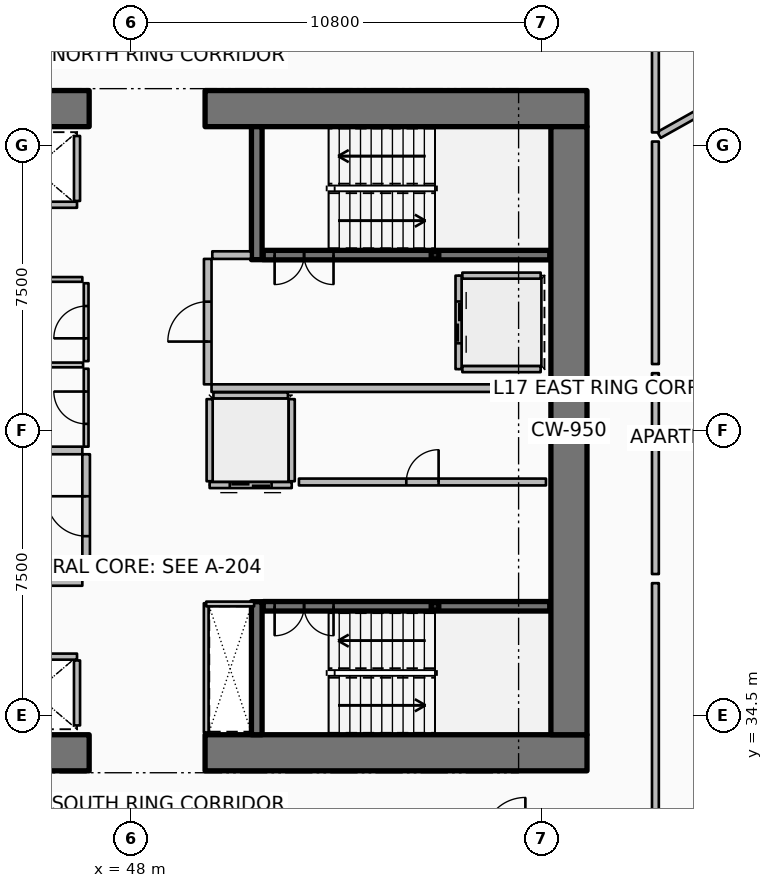
"""IFC4 building model, lengths in metres.
Left out: names, types, materials, properties, quantities, classifications, styles, units other than length and angle.
Written with IfcOpenShell. Run it as: python <this file> out.ifc"""

import sys

from ifc_helpers import new_model, si_unit, direction, frame, frame_2d, origin, origin_2d, place, context, subcontext, project, spatial, rectangle, hollow_rectangle, extrude, element, fill, save


model = new_model("IFC4")
c1 = context("Model", 3, precision=1e-05, world=origin(), true_north=direction((0.0, 1.0)))
c2 = subcontext(c1, "Body", "Model", "MODEL_VIEW")
j1 = project(units=[si_unit("LENGTHUNIT", "METRE"), si_unit("PLANEANGLEUNIT", "RADIAN")], contexts=[c1])
p1 = place(None, origin())
s1 = spatial("IfcSite", under=j1, at=p1, CompositionType="ELEMENT")
p2 = place(p1, origin())
s2 = spatial("IfcBuilding", under=s1, at=p2, CompositionType="ELEMENT")
p3 = place(p2, frame((0.0, 0.0, 71.4)))
s3 = spatial("IfcBuildingStorey", under=s2, at=p3, CompositionType="ELEMENT", Elevation=71.4)
p4 = place(p3, frame((36.85, 33.525, 0.0), z_axis=(0.0, 0.0, 1.0), x_axis=(1.0, 0.0, 0.0)))
e1 = element("IfcWall", 1, at=p4, inside=s3, PredefinedType="SHEAR", context=c2, shape_type="SweptSolid", body=[
    extrude(rectangle(XDim=10.05, YDim=0.95, at=frame_2d((5.025, 0.0))), origin(), (0.0, 0.0, 1.0), 3.75),
])
p5 = place(p3, frame((49.95, 33.525, 0.0), z_axis=(0.0, 0.0, 1.0), x_axis=(1.0, 0.0, 0.0)))
e2 = element("IfcWall", 2, at=p5, inside=s3, PredefinedType="SHEAR", context=c2, shape_type="SweptSolid", body=[
    extrude(rectangle(XDim=10.05, YDim=0.95, at=frame_2d((5.025, 0.0))), origin(), (0.0, 0.0, 1.0), 3.75),
])
p6 = place(p3, frame((36.85, 50.475, 0.0), z_axis=(0.0, 0.0, 1.0), x_axis=(1.0, 0.0, 0.0)))
e3 = element("IfcWall", 3, at=p6, inside=s3, PredefinedType="SHEAR", context=c2, shape_type="SweptSolid", body=[
    extrude(rectangle(XDim=10.05, YDim=0.95, at=frame_2d((5.025, 0.0))), origin(), (0.0, 0.0, 1.0), 3.75),
])
p7 = place(p3, frame((49.95, 50.475, 0.0), z_axis=(0.0, 0.0, 1.0), x_axis=(1.0, 0.0, 0.0)))
e4 = element("IfcWall", 4, at=p7, inside=s3, PredefinedType="SHEAR", context=c2, shape_type="SweptSolid", body=[
    extrude(rectangle(XDim=10.05, YDim=0.95, at=frame_2d((5.025, 0.0))), origin(), (0.0, 0.0, 1.0), 3.75),
])
p8 = place(p3, frame((59.525, 34.0, 0.0), z_axis=(0.0, 0.0, 1.0), x_axis=(0.0, 1.0, 0.0)))
e5 = element("IfcWall", 5, at=p8, inside=s3, PredefinedType="SHEAR", context=c2, shape_type="SweptSolid", body=[
    extrude(rectangle(XDim=16.0, YDim=0.95, at=frame_2d((8.0, 0.0))), origin(), (0.0, 0.0, 1.0), 3.75),
])
for number, where, z_axis, x_axis in (
    (6, (51.31, 46.5, 0.0), (0.0, 0.0, 1.0), (0.0, 1.0, 0.0)),
    (7, (51.31, 34.0, 0.0), (0.0, 0.0, 1.0), (0.0, 1.0, 0.0)),
):
    element("IfcWall", number, at=place(p3, frame(where, z_axis=z_axis, x_axis=x_axis)), inside=s3, PredefinedType="SHEAR", context=c2, shape_type="SweptSolid", body=[
        extrude(rectangle(XDim=3.5, YDim=0.28, at=frame_2d((1.75, 0.0))), origin(), (0.0, 0.0, 1.0), 3.75),
    ])
for number, where, z_axis, x_axis in (
    (8, (56.0, 46.62, 0.0), (0.0, 0.0, 1.0), (1.0, 0.0, 0.0)),
    (9, (56.0, 37.38, 0.0), (0.0, 0.0, 1.0), (1.0, 0.0, 0.0)),
):
    element("IfcColumn", number, at=place(p3, frame(where, z_axis=z_axis, x_axis=x_axis)), inside=s3, PredefinedType="COLUMN", context=c2, shape_type="SweptSolid", body=[
        extrude(hollow_rectangle(XDim=0.2, YDim=0.2, WallThickness=0.01, InnerFilletRadius=0.01, OuterFilletRadius=0.02, at=origin_2d()), origin(), (0.0, 0.0, 1.0), 1.67),
    ])
p9 = place(p3, frame((51.48, 46.62, 0.0), z_axis=(0.0, 0.0, 1.0), x_axis=(1.0, 0.0, 0.0)))
e10 = element("IfcWall", 10, at=p9, inside=s3, PredefinedType="SOLIDWALL", context=c2, shape_type="SweptSolid", body=[
    extrude(rectangle(XDim=7.54, YDim=0.25, at=frame_2d((3.77, 0.0))), origin(), (0.0, 0.0, 1.0), 3.35),
])
p10 = place(p9, frame((0.3, 0.0, 0.0)))
e11 = element("IfcOpeningElement", 11, at=p10, cuts=e10, PredefinedType="OPENING", context=c2, shape_type="SweptSolid", body=[
    extrude(rectangle(XDim=1.55, YDim=2.15, at=frame_2d((0.775, 1.075))), frame((0.0, 0.135, 0.0), z_axis=(0.0, -1.0, 0.0), x_axis=(1.0, 0.0, 0.0)), (0.0, 0.0, 1.0), 0.27),
])
p11 = place(p3, frame((51.48, 37.38, 0.0), z_axis=(0.0, 0.0, 1.0), x_axis=(1.0, 0.0, 0.0)))
e12 = element("IfcWall", 12, at=p11, inside=s3, PredefinedType="SOLIDWALL", context=c2, shape_type="SweptSolid", body=[
    extrude(rectangle(XDim=7.54, YDim=0.25, at=frame_2d((3.77, 0.0))), origin(), (0.0, 0.0, 1.0), 3.35),
])
p12 = place(p11, frame((0.3, 0.0, 0.0)))
e13 = element("IfcOpeningElement", 13, at=p12, cuts=e12, PredefinedType="OPENING", context=c2, shape_type="SweptSolid", body=[
    extrude(rectangle(XDim=1.55, YDim=2.15, at=frame_2d((0.775, 1.075))), frame((0.0, 0.135, 0.0), z_axis=(0.0, -1.0, 0.0), x_axis=(1.0, 0.0, 0.0)), (0.0, 0.0, 1.0), 0.27),
])
p13 = place(p3, frame((46.58, 47.945, 0.0), z_axis=(0.0, 0.0, 1.0), x_axis=(-1.0, 0.0, 0.0)))
e14 = element("IfcWall", 14, at=p13, inside=s3, PredefinedType="PARTITIONING", context=c2, shape_type="SweptSolid", body=[
    extrude(rectangle(XDim=2.26, YDim=0.16, at=frame_2d((1.13, 0.0))), origin(), (0.0, 0.0, 1.0), 3.35),
])
p14 = place(p3, frame((46.58, 48.045, 0.0), z_axis=(0.0, 0.0, 1.0), x_axis=(0.0, 1.0, 0.0)))
e15 = element("IfcWall", 15, at=p14, inside=s3, PredefinedType="PARTITIONING", context=c2, shape_type="SweptSolid", body=[
    extrude(rectangle(XDim=1.71, YDim=0.16, at=frame_2d((0.855, 0.0))), origin(), (0.0, 0.0, 1.0), 3.35),
])
p15 = place(p3, frame((44.32, 36.055, 0.0), z_axis=(0.0, 0.0, 1.0), x_axis=(1.0, 0.0, 0.0)))
e16 = element("IfcWall", 16, at=p15, inside=s3, PredefinedType="PARTITIONING", context=c2, shape_type="SweptSolid", body=[
    extrude(rectangle(XDim=2.26, YDim=0.16, at=frame_2d((1.13, 0.0))), origin(), (0.0, 0.0, 1.0), 3.35),
])
p16 = place(p3, frame((46.58, 34.245, 0.0), z_axis=(0.0, 0.0, 1.0), x_axis=(0.0, 1.0, 0.0)))
e17 = element("IfcWall", 17, at=p16, inside=s3, PredefinedType="PARTITIONING", context=c2, shape_type="SweptSolid", body=[
    extrude(rectangle(XDim=1.71, YDim=0.16, at=frame_2d((0.855, 0.0))), origin(), (0.0, 0.0, 1.0), 3.35),
])
p17 = place(p3, frame((56.62, 46.08, 0.0), z_axis=(0.0, 0.0, 1.0), x_axis=(0.0, -1.0, 0.0)))
e18 = element("IfcWall", 18, at=p17, inside=s3, PredefinedType="PARTITIONING", context=c2, shape_type="SweptSolid", body=[
    extrude(rectangle(XDim=2.46, YDim=0.16, at=frame_2d((1.23, 0.0))), origin(), (0.0, 0.0, 1.0), 3.35),
])
p18 = place(p17, frame((0.68, 0.0, 0.0)))
e19 = element("IfcOpeningElement", 19, at=p18, cuts=e18, PredefinedType="OPENING", context=c2, shape_type="SweptSolid", body=[
    extrude(rectangle(XDim=1.1, YDim=2.1, at=frame_2d((0.55, 1.05))), frame((0.0, 0.09, 0.0), z_axis=(0.0, -1.0, 0.0), x_axis=(1.0, 0.0, 0.0)), (0.0, 0.0, 1.0), 0.18),
])
for number, where, z_axis, x_axis in (
    (20, (56.72, 46.08, 0.0), (0.0, 0.0, 1.0), (1.0, 0.0, 0.0)),
    (21, (56.72, 43.62, 0.0), (0.0, 0.0, 1.0), (1.0, 0.0, 0.0)),
):
    element("IfcWall", number, at=place(p3, frame(where, z_axis=z_axis, x_axis=x_axis)), inside=s3, PredefinedType="PARTITIONING", context=c2, shape_type="SweptSolid", body=[
        extrude(rectangle(XDim=2.06, YDim=0.16, at=frame_2d((1.03, 0.0))), origin(), (0.0, 0.0, 1.0), 3.35),
    ])
p19 = place(p3, frame((52.23, 40.57, 0.0), z_axis=(0.0, 0.0, 1.0), x_axis=(-1.0, 0.0, 0.0)))
e22 = element("IfcWall", 22, at=p19, inside=s3, PredefinedType="PARTITIONING", context=c2, shape_type="SweptSolid", body=[
    extrude(rectangle(XDim=2.16, YDim=0.16, at=frame_2d((1.08, 0.0))), origin(), (0.0, 0.0, 1.0), 3.35),
])
p20 = place(p19, frame((0.53, 0.0, 0.0)))
e23 = element("IfcOpeningElement", 23, at=p20, cuts=e22, PredefinedType="OPENING", context=c2, shape_type="SweptSolid", body=[
    extrude(rectangle(XDim=1.1, YDim=2.1, at=frame_2d((0.55, 1.05))), frame((0.0, 0.09, 0.0), z_axis=(0.0, -1.0, 0.0), x_axis=(1.0, 0.0, 0.0)), (0.0, 0.0, 1.0), 0.18),
])
for number, where, z_axis, x_axis in (
    (24, (52.23, 40.67, 0.0), (0.0, 0.0, 1.0), (0.0, 1.0, 0.0)),
    (25, (50.07, 40.67, 0.0), (0.0, 0.0, 1.0), (0.0, 1.0, 0.0)),
):
    element("IfcWall", number, at=place(p3, frame(where, z_axis=z_axis, x_axis=x_axis)), inside=s3, PredefinedType="PARTITIONING", context=c2, shape_type="SweptSolid", body=[
        extrude(rectangle(XDim=2.16, YDim=0.16, at=frame_2d((1.08, 0.0))), origin(), (0.0, 0.0, 1.0), 3.35),
    ])
p21 = place(p3, frame((50.17, 42.93, 0.0), z_axis=(0.0, 0.0, 1.0), x_axis=(1.0, 0.0, 0.0)))
e26 = element("IfcWall", 26, at=p21, inside=s3, PredefinedType="PARTITIONING", context=c2, shape_type="SweptSolid", body=[
    extrude(rectangle(XDim=1.96, YDim=0.16, at=frame_2d((0.98, 0.0))), origin(), (0.0, 0.0, 1.0), 3.35),
])
p22 = place(p3, frame((52.42, 40.65, 0.0), z_axis=(0.0, 0.0, 1.0), x_axis=(1.0, 0.0, 0.0)))
e27 = element("IfcWall", 27, at=p22, inside=s3, PredefinedType="PARTITIONING", context=c2, shape_type="SweptSolid", body=[
    extrude(rectangle(XDim=6.5, YDim=0.18, at=frame_2d((3.25, 0.0))), origin(), (0.0, 0.0, 1.0), 3.35),
])
p23 = place(p22, frame((2.825, 0.0, 0.0)))
e28 = element("IfcOpeningElement", 28, at=p23, cuts=e27, PredefinedType="OPENING", context=c2, shape_type="SweptSolid", body=[
    extrude(rectangle(XDim=0.85, YDim=2.06, at=frame_2d((0.425, 1.03))), frame((0.0, 0.1, 0.0), z_axis=(0.0, -1.0, 0.0), x_axis=(1.0, 0.0, 0.0)), (0.0, 0.0, 1.0), 0.2),
])
p24 = place(p3, frame((41.35, 38.02, 0.0), z_axis=(0.0, 0.0, 1.0), x_axis=(1.0, 0.0, 0.0)))
e29 = element("IfcWall", 29, at=p24, inside=s3, PredefinedType="PARTITIONING", context=c2, shape_type="SweptSolid", body=[
    extrude(rectangle(XDim=5.37, YDim=0.2, at=frame_2d((2.685, 0.0))), origin(), (0.0, 0.0, 1.0), 3.35),
])
p25 = place(p3, frame((43.92, 41.48, 0.0), z_axis=(0.0, 0.0, 1.0), x_axis=(1.0, 0.0, 0.0)))
e30 = element("IfcWall", 30, at=p25, inside=s3, PredefinedType="PARTITIONING", context=c2, shape_type="SweptSolid", body=[
    extrude(rectangle(XDim=2.8, YDim=0.2, at=frame_2d((1.4, 0.0))), origin(), (0.0, 0.0, 1.0), 3.35),
])
p26 = place(p3, frame((46.82, 38.12, 0.0), z_axis=(0.0, 0.0, 1.0), x_axis=(0.0, 1.0, 0.0)))
e31 = element("IfcWall", 31, at=p26, inside=s3, PredefinedType="PARTITIONING", context=c2, shape_type="SweptSolid", body=[
    extrude(rectangle(XDim=3.26, YDim=0.2, at=frame_2d((1.63, 0.0))), origin(), (0.0, 0.0, 1.0), 3.35),
])
p27 = place(p26, frame((1.105, 0.0, 0.0)))
e32 = element("IfcOpeningElement", 32, at=p27, cuts=e31, PredefinedType="OPENING", context=c2, shape_type="SweptSolid", body=[
    extrude(rectangle(XDim=1.05, YDim=2.1, at=frame_2d((0.525, 1.05))), frame((0.0, 0.11, 0.0), z_axis=(0.0, -1.0, 0.0), x_axis=(1.0, 0.0, 0.0)), (0.0, 0.0, 1.0), 0.22),
])
p28 = place(p3, frame((50.12, 43.12, 0.0), z_axis=(0.0, 0.0, 1.0), x_axis=(1.0, 0.0, 0.0)))
e33 = element("IfcWall", 33, at=p28, inside=s3, PredefinedType="PARTITIONING", context=c2, shape_type="SweptSolid", body=[
    extrude(rectangle(XDim=8.88, YDim=0.2, at=frame_2d((4.44, 0.0))), origin(), (0.0, 0.0, 1.0), 3.35),
])
p29 = place(p3, frame((50.14, 46.62, 0.0), z_axis=(0.0, 0.0, 1.0), x_axis=(1.0, 0.0, 0.0)))
e34 = element("IfcWall", 34, at=p29, inside=s3, PredefinedType="PARTITIONING", context=c2, shape_type="SweptSolid", body=[
    extrude(rectangle(XDim=1.02, YDim=0.2, at=frame_2d((0.51, 0.0))), origin(), (0.0, 0.0, 1.0), 3.35),
])
p30 = place(p3, frame((50.02, 43.22, 0.0), z_axis=(0.0, 0.0, 1.0), x_axis=(0.0, 1.0, 0.0)))
e35 = element("IfcWall", 35, at=p30, inside=s3, PredefinedType="PARTITIONING", context=c2, shape_type="SweptSolid", body=[
    extrude(rectangle(XDim=3.3, YDim=0.2, at=frame_2d((1.65, 0.0))), origin(), (0.0, 0.0, 1.0), 3.35),
])
p31 = place(p30, frame((1.125, 0.0, 0.0)))
e36 = element("IfcOpeningElement", 36, at=p31, cuts=e35, PredefinedType="OPENING", context=c2, shape_type="SweptSolid", body=[
    extrude(rectangle(XDim=1.05, YDim=2.1, at=frame_2d((0.525, 1.05))), frame((0.0, 0.11, 0.0), z_axis=(0.0, -1.0, 0.0), x_axis=(1.0, 0.0, 0.0)), (0.0, 0.0, 1.0), 0.22),
])
p32 = place(p3, frame((41.36, 45.98, 0.0), z_axis=(0.0, 0.0, 1.0), x_axis=(1.0, 0.0, 0.0)))
e37 = element("IfcWall", 37, at=p32, inside=s3, PredefinedType="PARTITIONING", context=c2, shape_type="SweptSolid", body=[
    extrude(rectangle(XDim=5.36, YDim=0.125, at=frame_2d((2.68, 0.0))), origin(), (0.0, 0.0, 1.0), 2.79),
])
p33 = place(p3, frame((49.98, 34.06, 0.0), z_axis=(0.0, 0.0, 1.0), x_axis=(0.0, 1.0, 0.0)))
e38 = element("IfcWall", 38, at=p33, inside=s3, PredefinedType="PARTITIONING", context=c2, shape_type="SweptSolid", body=[
    extrude(rectangle(XDim=3.4, YDim=0.125, at=frame_2d((1.7, 0.0))), origin(), (0.0, 0.0, 1.0), 2.79),
])
p34 = place(p3, frame((49.98, 37.44, 0.0), z_axis=(0.0, 0.0, 1.0), x_axis=(1.0, 0.0, 0.0)))
e39 = element("IfcWall", 39, at=p34, inside=s3, PredefinedType="PARTITIONING", context=c2, shape_type="SweptSolid", body=[
    extrude(rectangle(XDim=1.26, YDim=0.125, at=frame_2d((0.63, 0.0))), origin(), (0.0, 0.0, 1.0), 2.79),
])
p35 = place(p3, frame((44.03, 43.73, 0.0), z_axis=(0.0, 0.0, 1.0), x_axis=(1.0, 0.0, 0.0)))
e40 = element("IfcWall", 40, at=p35, inside=s3, PredefinedType="PARTITIONING", context=c2, shape_type="SweptSolid", body=[
    extrude(rectangle(XDim=2.71, YDim=0.125, at=frame_2d((1.355, 0.0))), origin(), (0.0, 0.0, 1.0), 2.79),
])
p36 = place(p3, frame((46.82, 41.58, 0.0), z_axis=(0.0, 0.0, 1.0), x_axis=(0.0, 1.0, 0.0)))
e41 = element("IfcWall", 41, at=p36, inside=s3, PredefinedType="PARTITIONING", context=c2, shape_type="SweptSolid", body=[
    extrude(rectangle(XDim=2.05, YDim=0.125, at=frame_2d((1.025, 0.0))), origin(), (0.0, 0.0, 1.0), 2.79),
])
p37 = place(p36, frame((0.6, 0.0, 0.0)))
e42 = element("IfcOpeningElement", 42, at=p37, cuts=e41, PredefinedType="OPENING", context=c2, shape_type="SweptSolid", body=[
    extrude(rectangle(XDim=0.85, YDim=2.06, at=frame_2d((0.425, 1.03))), frame((0.0, 0.073, 0.0), z_axis=(0.0, -1.0, 0.0), x_axis=(1.0, 0.0, 0.0)), (0.0, 0.0, 1.0), 0.145),
])
p38 = place(p3, frame((46.82, 43.83, 0.0), z_axis=(0.0, 0.0, 1.0), x_axis=(0.0, 1.0, 0.0)))
e43 = element("IfcWall", 43, at=p38, inside=s3, PredefinedType="PARTITIONING", context=c2, shape_type="SweptSolid", body=[
    extrude(rectangle(XDim=2.05, YDim=0.125, at=frame_2d((1.025, 0.0))), origin(), (0.0, 0.0, 1.0), 2.79),
])
p39 = place(p38, frame((0.6, 0.0, 0.0)))
e44 = element("IfcOpeningElement", 44, at=p39, cuts=e43, PredefinedType="OPENING", context=c2, shape_type="SweptSolid", body=[
    extrude(rectangle(XDim=0.85, YDim=2.06, at=frame_2d((0.425, 1.03))), frame((0.0, 0.073, 0.0), z_axis=(0.0, -1.0, 0.0), x_axis=(1.0, 0.0, 0.0)), (0.0, 0.0, 1.0), 0.145),
])
p40 = place(p3, frame((61.896, 49.782, 0.0), z_axis=(0.0, 0.0, 1.0), x_axis=(0.872493215695, 0.488626225828, 0.0)))
e45 = element("IfcWall", 45, at=p40, inside=s3, PredefinedType="PARTITIONING", context=c2, shape_type="SweptSolid", body=[
    extrude(rectangle(XDim=15.612, YDim=0.18, at=frame_2d((7.806, 0.0))), origin(), (0.0, 0.0, 1.0), 2.307),
])
p41 = place(p3, frame((61.8, 49.848, 0.0), z_axis=(0.0, 0.0, 1.0), x_axis=(0.0, 1.0, 0.0)))
e46 = element("IfcWall", 46, at=p41, inside=s3, PredefinedType="PARTITIONING", context=c2, shape_type="SweptSolid", body=[
    extrude(rectangle(XDim=2.781, YDim=0.18, at=frame_2d((1.391, 0.0))), origin(), (0.0, 0.0, 1.0), 2.307),
])
p42 = place(p3, frame((61.8, 31.37, 0.0), z_axis=(0.0, 0.0, 1.0), x_axis=(0.0, 1.0, 0.0)))
e47 = element("IfcWall", 47, at=p42, inside=s3, PredefinedType="PARTITIONING", context=c2, shape_type="SweptSolid", body=[
    extrude(rectangle(XDim=6.618, YDim=0.18, at=frame_2d((3.309, 0.0))), origin(), (0.0, 0.0, 1.0), 2.307),
])
p43 = place(p3, frame((61.8, 38.228, 0.0), z_axis=(0.0, 0.0, 1.0), x_axis=(0.0, 1.0, 0.0)))
e48 = element("IfcWall", 48, at=p43, inside=s3, PredefinedType="PARTITIONING", context=c2, shape_type="SweptSolid", body=[
    extrude(rectangle(XDim=5.285, YDim=0.18, at=frame_2d((2.643, 0.0))), origin(), (0.0, 0.0, 1.0), 2.307),
])
p44 = place(p3, frame((61.8, 43.753, 0.0), z_axis=(0.0, 0.0, 1.0), x_axis=(0.0, 1.0, 0.0)))
e49 = element("IfcWall", 49, at=p44, inside=s3, PredefinedType="PARTITIONING", context=c2, shape_type="SweptSolid", body=[
    extrude(rectangle(XDim=5.855, YDim=0.18, at=frame_2d((2.927, 0.0))), origin(), (0.0, 0.0, 1.0), 2.307),
])
p45 = place(p10, origin())
e50 = element("IfcDoor", 50, at=p45, inside=s3, OperationType="DOUBLE_DOOR_SINGLE_SWING", PredefinedType="DOOR", context=c2, shape_type="SweptSolid", body=[
    extrude(rectangle(XDim=1.55, YDim=2.15, at=frame_2d((0.775, 1.075))), frame((0.0, 0.025, 0.0), z_axis=(0.0, -1.0, 0.0), x_axis=(1.0, 0.0, 0.0)), (0.0, 0.0, 1.0), 0.05),
])
fill(e11, e50)
p46 = place(p12, origin())
e51 = element("IfcDoor", 51, at=p46, inside=s3, OperationType="DOUBLE_DOOR_SINGLE_SWING", PredefinedType="DOOR", context=c2, shape_type="SweptSolid", body=[
    extrude(rectangle(XDim=1.55, YDim=2.15, at=frame_2d((0.775, 1.075))), frame((0.0, 0.025, 0.0), z_axis=(0.0, -1.0, 0.0), x_axis=(1.0, 0.0, 0.0)), (0.0, 0.0, 1.0), 0.05),
])
fill(e13, e51)
p47 = place(p18, origin())
e52 = element("IfcDoor", 52, at=p47, inside=s3, OperationType="DOUBLE_DOOR_SLIDING", PredefinedType="DOOR", context=c2, shape_type="SweptSolid", body=[
    extrude(rectangle(XDim=1.1, YDim=2.1, at=frame_2d((0.55, 1.05))), frame((0.0, 0.025, 0.0), z_axis=(0.0, -1.0, 0.0), x_axis=(1.0, 0.0, 0.0)), (0.0, 0.0, 1.0), 0.05),
])
fill(e19, e52)
p48 = place(p20, origin())
e53 = element("IfcDoor", 53, at=p48, inside=s3, OperationType="DOUBLE_DOOR_SLIDING", PredefinedType="DOOR", context=c2, shape_type="SweptSolid", body=[
    extrude(rectangle(XDim=1.1, YDim=2.1, at=frame_2d((0.55, 1.05))), frame((0.0, 0.025, 0.0), z_axis=(0.0, -1.0, 0.0), x_axis=(1.0, 0.0, 0.0)), (0.0, 0.0, 1.0), 0.05),
])
fill(e23, e53)
p49 = place(p23, origin())
e54 = element("IfcDoor", 54, at=p49, inside=s3, OperationType="SINGLE_SWING_RIGHT", PredefinedType="DOOR", context=c2, shape_type="SweptSolid", body=[
    extrude(rectangle(XDim=0.85, YDim=2.06, at=frame_2d((0.425, 1.03))), frame((0.0, 0.025, 0.0), z_axis=(0.0, -1.0, 0.0), x_axis=(1.0, 0.0, 0.0)), (0.0, 0.0, 1.0), 0.05),
])
fill(e28, e54)
p50 = place(p27, origin())
e55 = element("IfcDoor", 55, at=p50, inside=s3, OperationType="SINGLE_SWING_RIGHT", PredefinedType="DOOR", context=c2, shape_type="SweptSolid", body=[
    extrude(rectangle(XDim=1.05, YDim=2.1, at=frame_2d((0.525, 1.05))), frame((0.0, 0.025, 0.0), z_axis=(0.0, -1.0, 0.0), x_axis=(1.0, 0.0, 0.0)), (0.0, 0.0, 1.0), 0.05),
])
fill(e32, e55)
p51 = place(p31, origin())
e56 = element("IfcDoor", 56, at=p51, inside=s3, OperationType="SINGLE_SWING_LEFT", PredefinedType="DOOR", context=c2, shape_type="SweptSolid", body=[
    extrude(rectangle(XDim=1.05, YDim=2.1, at=frame_2d((0.525, 1.05))), frame((0.0, 0.025, 0.0), z_axis=(0.0, -1.0, 0.0), x_axis=(1.0, 0.0, 0.0)), (0.0, 0.0, 1.0), 0.05),
])
fill(e36, e56)
p52 = place(p37, origin())
e57 = element("IfcDoor", 57, at=p52, inside=s3, OperationType="SINGLE_SWING_RIGHT", PredefinedType="DOOR", context=c2, shape_type="SweptSolid", body=[
    extrude(rectangle(XDim=0.85, YDim=2.06, at=frame_2d((0.425, 1.03))), frame((0.0, 0.025, 0.0), z_axis=(0.0, -1.0, 0.0), x_axis=(1.0, 0.0, 0.0)), (0.0, 0.0, 1.0), 0.05),
])
fill(e42, e57)
p53 = place(p39, origin())
e58 = element("IfcDoor", 58, at=p53, inside=s3, OperationType="SINGLE_SWING_LEFT", PredefinedType="DOOR", context=c2, shape_type="SweptSolid", body=[
    extrude(rectangle(XDim=0.85, YDim=2.06, at=frame_2d((0.425, 1.03))), frame((0.0, 0.025, 0.0), z_axis=(0.0, -1.0, 0.0), x_axis=(1.0, 0.0, 0.0)), (0.0, 0.0, 1.0), 0.05),
])
fill(e44, e58)
save(model, sys.argv[1])
